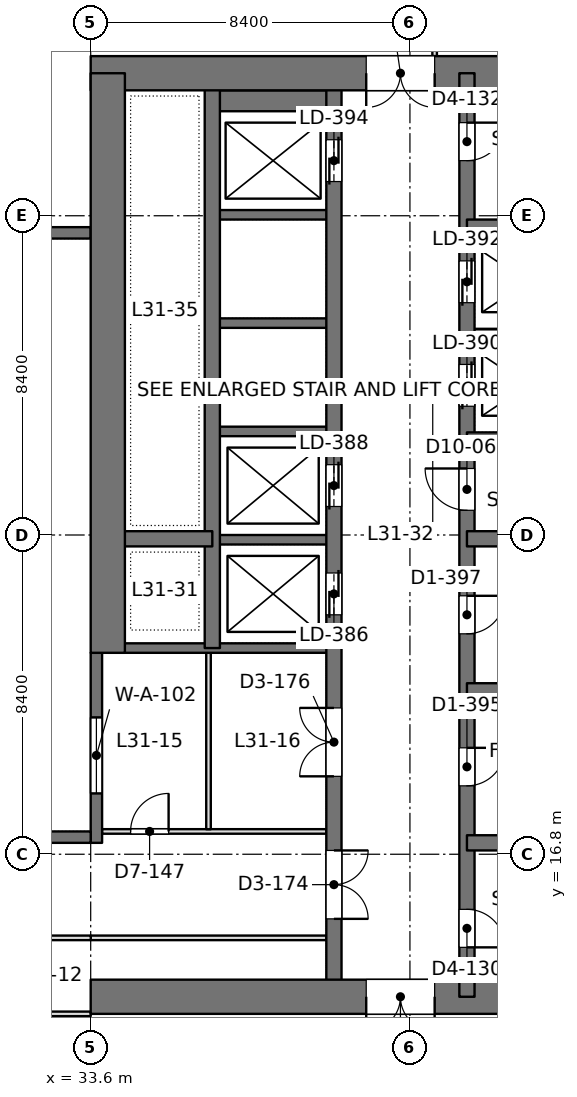
"""IFC4 building model, lengths in metres.
Left out: names, types, materials, properties, quantities, classifications, styles, units other than length and angle.
Written with IfcOpenShell. Run it as: python <this file> out.ifc"""

import sys

from ifc_helpers import new_model, si_unit, direction, frame, frame_2d, origin, place, context, subcontext, project, spatial, rectangle, extrude, element, fill, save


model = new_model("IFC4")
c1 = context("Model", 3, precision=1e-05, world=origin(), true_north=direction((0.0, 1.0)))
c2 = subcontext(c1, "Body", "Model", "MODEL_VIEW")
j1 = project(units=[si_unit("LENGTHUNIT", "METRE"), si_unit("PLANEANGLEUNIT", "RADIAN")], contexts=[c1])
p1 = place(None, origin())
s1 = spatial("IfcSite", under=j1, at=p1, CompositionType="ELEMENT")
p2 = place(p1, origin())
s2 = spatial("IfcBuilding", under=s1, at=p2, CompositionType="ELEMENT")
p3 = place(p2, frame((0.0, 0.0, 138.6)))
s3 = spatial("IfcBuildingStorey", under=s2, at=p3, CompositionType="ELEMENT", Elevation=138.6)
p4 = place(p3, frame((33.6, 13.05, 0.0), z_axis=(0.0, 0.0, 1.0), x_axis=(1.0, 0.0, 0.0)))
e1 = element("IfcWall", 1, at=p4, inside=s3, PredefinedType="SHEAR", context=c2, shape_type="SweptSolid", body=[
    extrude(rectangle(XDim=18.0, YDim=0.9, at=frame_2d((9.0, 0.0))), origin(), (0.0, 0.0, 1.0), 4.2),
])
p5 = place(p4, frame((7.25, 0.0, 0.0)))
e2 = element("IfcOpeningElement", 2, at=p5, cuts=e1, PredefinedType="OPENING", context=c2, shape_type="SweptSolid", body=[
    extrude(rectangle(XDim=1.8, YDim=2.4, at=frame_2d((0.9, 1.2))), frame((0.0, 0.46, 0.0), z_axis=(0.0, -1.0, 0.0), x_axis=(1.0, 0.0, 0.0)), (0.0, 0.0, 1.0), 0.92),
])
p6 = place(p3, frame((33.6, 37.35, 0.0), z_axis=(0.0, 0.0, 1.0), x_axis=(1.0, 0.0, 0.0)))
e3 = element("IfcWall", 3, at=p6, inside=s3, PredefinedType="SHEAR", context=c2, shape_type="SweptSolid", body=[
    extrude(rectangle(XDim=18.0, YDim=0.9, at=frame_2d((9.0, 0.0))), origin(), (0.0, 0.0, 1.0), 4.2),
])
p7 = place(p6, frame((7.25, 0.0, 0.0)))
e4 = element("IfcOpeningElement", 4, at=p7, cuts=e3, PredefinedType="OPENING", context=c2, shape_type="SweptSolid", body=[
    extrude(rectangle(XDim=1.8, YDim=2.4, at=frame_2d((0.9, 1.2))), frame((0.0, 0.46, 0.0), z_axis=(0.0, -1.0, 0.0), x_axis=(1.0, 0.0, 0.0)), (0.0, 0.0, 1.0), 0.92),
])
p8 = place(p3, frame((34.05, 22.1, 0.0), z_axis=(0.0, 0.0, 1.0), x_axis=(0.0, 1.0, 0.0)))
e5 = element("IfcWall", 5, at=p8, inside=s3, PredefinedType="SHEAR", context=c2, shape_type="SweptSolid", body=[
    extrude(rectangle(XDim=15.25, YDim=0.9, at=frame_2d((7.625, 0.0))), origin(), (0.0, 0.0, 1.0), 4.2),
])
p9 = place(p3, frame((43.5, 13.05, 0.0), z_axis=(0.0, 0.0, 1.0), x_axis=(0.0, 1.0, 0.0)))
e6 = element("IfcWall", 6, at=p9, inside=s3, PredefinedType="SHEAR", context=c2, shape_type="SweptSolid", body=[
    extrude(rectangle(XDim=24.3, YDim=0.4, at=frame_2d((12.15, 0.0))), origin(), (0.0, 0.0, 1.0), 4.2),
])
p10 = place(p9, frame((1.3, 0.0, 0.0)))
e7 = element("IfcOpeningElement", 7, at=p10, cuts=e6, PredefinedType="OPENING", context=c2, shape_type="SweptSolid", body=[
    extrude(rectangle(XDim=1.0, YDim=2.2, at=frame_2d((0.5, 1.1))), frame((0.0, 0.21, 0.0), z_axis=(0.0, -1.0, 0.0), x_axis=(1.0, 0.0, 0.0)), (0.0, 0.0, 1.0), 0.42),
])
p11 = place(p9, frame((22.0, 0.0, 0.0)))
e8 = element("IfcOpeningElement", 8, at=p11, cuts=e6, PredefinedType="OPENING", context=c2, shape_type="SweptSolid", body=[
    extrude(rectangle(XDim=1.0, YDim=2.2, at=frame_2d((0.5, 1.1))), frame((0.0, 0.21, 0.0), z_axis=(0.0, -1.0, 0.0), x_axis=(1.0, 0.0, 0.0)), (0.0, 0.0, 1.0), 0.42),
])
p12 = place(p9, frame((5.55, 0.0, 0.0)))
e9 = element("IfcOpeningElement", 9, at=p12, cuts=e6, PredefinedType="OPENING", context=c2, shape_type="SweptSolid", body=[
    extrude(rectangle(XDim=1.0, YDim=2.2, at=frame_2d((0.5, 1.1))), frame((0.0, 0.21, 0.0), z_axis=(0.0, -1.0, 0.0), x_axis=(1.0, 0.0, 0.0)), (0.0, 0.0, 1.0), 0.42),
])
p13 = place(p9, frame((9.55, 0.0, 0.0)))
e10 = element("IfcOpeningElement", 10, at=p13, cuts=e6, PredefinedType="OPENING", context=c2, shape_type="SweptSolid", body=[
    extrude(rectangle(XDim=1.0, YDim=2.2, at=frame_2d((0.5, 1.1))), frame((0.0, 0.21, 0.0), z_axis=(0.0, -1.0, 0.0), x_axis=(1.0, 0.0, 0.0)), (0.0, 0.0, 1.0), 0.42),
])
p14 = place(p9, frame((12.8, 0.0, 0.0)))
e11 = element("IfcOpeningElement", 11, at=p14, cuts=e6, PredefinedType="OPENING", context=c2, shape_type="SweptSolid", body=[
    extrude(rectangle(XDim=1.1, YDim=2.2, at=frame_2d((0.55, 1.1))), frame((0.0, 0.21, 0.0), z_axis=(0.0, -1.0, 0.0), x_axis=(1.0, 0.0, 0.0)), (0.0, 0.0, 1.0), 0.42),
])
p15 = place(p9, frame((15.538, 0.0, 0.0)))
e12 = element("IfcOpeningElement", 12, at=p15, cuts=e6, PredefinedType="OPENING", context=c2, shape_type="SweptSolid", body=[
    extrude(rectangle(XDim=1.1, YDim=2.2, at=frame_2d((0.55, 1.1))), frame((0.0, 0.21, 0.0), z_axis=(0.0, -1.0, 0.0), x_axis=(1.0, 0.0, 0.0)), (0.0, 0.0, 1.0), 0.42),
])
p16 = place(p9, frame((18.262, 0.0, 0.0)))
e13 = element("IfcOpeningElement", 13, at=p16, cuts=e6, PredefinedType="OPENING", context=c2, shape_type="SweptSolid", body=[
    extrude(rectangle(XDim=1.1, YDim=2.2, at=frame_2d((0.55, 1.1))), frame((0.0, 0.21, 0.0), z_axis=(0.0, -1.0, 0.0), x_axis=(1.0, 0.0, 0.0)), (0.0, 0.0, 1.0), 0.42),
])
p17 = place(p3, frame((40.0, 13.05, 0.0), z_axis=(0.0, 0.0, 1.0), x_axis=(0.0, 1.0, 0.0)))
e14 = element("IfcWall", 14, at=p17, inside=s3, PredefinedType="SHEAR", context=c2, shape_type="SweptSolid", body=[
    extrude(rectangle(XDim=24.3, YDim=0.4, at=frame_2d((12.15, 0.0))), origin(), (0.0, 0.0, 1.0), 4.2),
])
p18 = place(p17, frame((10.05, 0.0, 0.0)))
e15 = element("IfcOpeningElement", 15, at=p18, cuts=e14, PredefinedType="OPENING", context=c2, shape_type="SweptSolid", body=[
    extrude(rectangle(XDim=1.1, YDim=2.2, at=frame_2d((0.55, 1.1))), frame((0.0, 0.21, 0.0), z_axis=(0.0, -1.0, 0.0), x_axis=(1.0, 0.0, 0.0)), (0.0, 0.0, 1.0), 0.42),
])
p19 = place(p17, frame((12.9, 0.0, 0.0)))
e16 = element("IfcOpeningElement", 16, at=p19, cuts=e14, PredefinedType="OPENING", context=c2, shape_type="SweptSolid", body=[
    extrude(rectangle(XDim=1.1, YDim=2.2, at=frame_2d((0.55, 1.1))), frame((0.0, 0.21, 0.0), z_axis=(0.0, -1.0, 0.0), x_axis=(1.0, 0.0, 0.0)), (0.0, 0.0, 1.0), 0.42),
])
p20 = place(p17, frame((21.45, 0.0, 0.0)))
e17 = element("IfcOpeningElement", 17, at=p20, cuts=e14, PredefinedType="OPENING", context=c2, shape_type="SweptSolid", body=[
    extrude(rectangle(XDim=1.1, YDim=2.2, at=frame_2d((0.55, 1.1))), frame((0.0, 0.21, 0.0), z_axis=(0.0, -1.0, 0.0), x_axis=(1.0, 0.0, 0.0)), (0.0, 0.0, 1.0), 0.42),
])
p21 = place(p17, frame((2.05, 0.0, 0.0)))
e18 = element("IfcOpeningElement", 18, at=p21, cuts=e14, PredefinedType="OPENING", context=c2, shape_type="SweptSolid", body=[
    extrude(rectangle(XDim=1.8, YDim=2.4, at=frame_2d((0.9, 1.2))), frame((0.0, 0.21, 0.0), z_axis=(0.0, -1.0, 0.0), x_axis=(1.0, 0.0, 0.0)), (0.0, 0.0, 1.0), 0.42),
])
p22 = place(p17, frame((5.8, 0.0, 0.0)))
e19 = element("IfcOpeningElement", 19, at=p22, cuts=e14, PredefinedType="OPENING", context=c2, shape_type="SweptSolid", body=[
    extrude(rectangle(XDim=1.8, YDim=2.4, at=frame_2d((0.9, 1.2))), frame((0.0, 0.21, 0.0), z_axis=(0.0, -1.0, 0.0), x_axis=(1.0, 0.0, 0.0)), (0.0, 0.0, 1.0), 0.42),
])
p23 = place(p3, frame((36.8, 22.225, 0.0), z_axis=(0.0, 0.0, 1.0), x_axis=(0.0, 1.0, 0.0)))
e20 = element("IfcWall", 20, at=p23, inside=s3, PredefinedType="SHEAR", context=c2, shape_type="SweptSolid", body=[
    extrude(rectangle(XDim=15.125, YDim=0.4, at=frame_2d((7.562, 0.0))), origin(), (0.0, 0.0, 1.0), 4.2),
])
for number, where, z_axis, x_axis in (
    (21, (51.15, 17.1, 0.0), (0.0, 0.0, 1.0), (-1.0, 0.0, 0.0)),
    (22, (51.15, 21.1, 0.0), (0.0, 0.0, 1.0), (-1.0, 0.0, 0.0)),
    (23, (51.15, 25.1, 0.0), (0.0, 0.0, 1.0), (-1.0, 0.0, 0.0)),
    (24, (51.15, 27.7, 0.0), (0.0, 0.0, 1.0), (-1.0, 0.0, 0.0)),
    (25, (51.15, 33.3, 0.0), (0.0, 0.0, 1.0), (-1.0, 0.0, 0.0)),
):
    element("IfcWall", number, at=place(p3, frame(where, z_axis=z_axis, x_axis=x_axis)), inside=s3, PredefinedType="SHEAR", context=c2, shape_type="SweptSolid", body=[
        extrude(rectangle(XDim=7.65, YDim=0.4, at=frame_2d((3.825, 0.0))), origin(), (0.0, 0.0, 1.0), 4.2),
    ])
p24 = place(p3, frame((46.7, 30.5, 0.0), z_axis=(0.0, 0.0, 1.0), x_axis=(-1.0, 0.0, 0.0)))
e26 = element("IfcWall", 26, at=p24, inside=s3, PredefinedType="SHEAR", context=c2, shape_type="SweptSolid", body=[
    extrude(rectangle(XDim=3.2, YDim=0.25, at=frame_2d((1.6, 0.0))), origin(), (0.0, 0.0, 1.0), 4.2),
])
p25 = place(p3, frame((36.8, 25.1, 0.0), z_axis=(0.0, 0.0, 1.0), x_axis=(-1.0, 0.0, 0.0)))
e27 = element("IfcWall", 27, at=p25, inside=s3, PredefinedType="SHEAR", context=c2, shape_type="SweptSolid", body=[
    extrude(rectangle(XDim=2.75, YDim=0.4, at=frame_2d((1.375, 0.0))), origin(), (0.0, 0.0, 1.0), 4.2),
])
p26 = place(p3, frame((40.0, 22.225, 0.0), z_axis=(0.0, 0.0, 1.0), x_axis=(-1.0, 0.0, 0.0)))
e28 = element("IfcWall", 28, at=p26, inside=s3, PredefinedType="SHEAR", context=c2, shape_type="SweptSolid", body=[
    extrude(rectangle(XDim=5.95, YDim=0.25, at=frame_2d((2.975, 0.0))), origin(), (0.0, 0.0, 1.0), 4.2),
])
for number, where, z_axis, x_axis in (
    (29, (40.0, 25.075, 0.0), (0.0, 0.0, 1.0), (-1.0, 0.0, 0.0)),
    (30, (40.0, 27.925, 0.0), (0.0, 0.0, 1.0), (-1.0, 0.0, 0.0)),
    (31, (40.0, 30.775, 0.0), (0.0, 0.0, 1.0), (-1.0, 0.0, 0.0)),
    (32, (40.0, 33.625, 0.0), (0.0, 0.0, 1.0), (-1.0, 0.0, 0.0)),
):
    element("IfcWall", number, at=place(p3, frame(where, z_axis=z_axis, x_axis=x_axis)), inside=s3, PredefinedType="SHEAR", context=c2, shape_type="SweptSolid", body=[
        extrude(rectangle(XDim=3.2, YDim=0.25, at=frame_2d((1.6, 0.0))), origin(), (0.0, 0.0, 1.0), 4.2),
    ])
p27 = place(p3, frame((40.0, 36.625, 0.0), z_axis=(0.0, 0.0, 1.0), x_axis=(-1.0, 0.0, 0.0)))
e33 = element("IfcWall", 33, at=p27, inside=s3, PredefinedType="SHEAR", context=c2, shape_type="SweptSolid", body=[
    extrude(rectangle(XDim=3.2, YDim=0.55, at=frame_2d((1.6, 0.0))), origin(), (0.0, 0.0, 1.0), 4.2),
])
p28 = place(p3, frame((33.75, 17.1, 0.0), z_axis=(0.0, 0.0, 1.0), x_axis=(0.0, 1.0, 0.0)))
e34 = element("IfcWall", 34, at=p28, inside=s3, PredefinedType="SOLIDWALL", context=c2, shape_type="SweptSolid", body=[
    extrude(rectangle(XDim=5.0, YDim=0.3, at=frame_2d((2.5, 0.0))), origin(), (0.0, 0.0, 1.0), 4.05),
])
p29 = place(p28, frame((1.3, 0.0, 0.1)))
e35 = element("IfcOpeningElement", 35, at=p29, cuts=e34, PredefinedType="OPENING", context=c2, shape_type="SweptSolid", body=[
    extrude(rectangle(XDim=2.0, YDim=3.0, at=frame_2d((1.0, 1.5))), frame((0.0, 0.16, 0.0), z_axis=(0.0, -1.0, 0.0), x_axis=(1.0, 0.0, 0.0)), (0.0, 0.0, 1.0), 0.32),
])
p30 = place(p3, frame((26.025, 17.25, 0.0), z_axis=(0.0, 0.0, 1.0), x_axis=(1.0, 0.0, 0.0)))
e36 = element("IfcWall", 36, at=p30, inside=s3, PredefinedType="SOLIDWALL", context=c2, shape_type="SweptSolid", body=[
    extrude(rectangle(XDim=7.575, YDim=0.3, at=frame_2d((3.788, 0.0))), origin(), (0.0, 0.0, 1.0), 4.05),
])
p31 = place(p30, frame((0.587, 0.0, 0.1)))
e37 = element("IfcOpeningElement", 37, at=p31, cuts=e36, PredefinedType="OPENING", context=c2, shape_type="SweptSolid", body=[
    extrude(rectangle(XDim=2.0, YDim=3.0, at=frame_2d((1.0, 1.5))), frame((0.0, 0.16, 0.0), z_axis=(0.0, -1.0, 0.0), x_axis=(1.0, 0.0, 0.0)), (0.0, 0.0, 1.0), 0.32),
])
p32 = place(p30, frame((4.188, 0.0, 0.1)))
e38 = element("IfcOpeningElement", 38, at=p32, cuts=e36, PredefinedType="OPENING", context=c2, shape_type="SweptSolid", body=[
    extrude(rectangle(XDim=2.0, YDim=3.0, at=frame_2d((1.0, 1.5))), frame((0.0, 0.16, 0.0), z_axis=(0.0, -1.0, 0.0), x_axis=(1.0, 0.0, 0.0)), (0.0, 0.0, 1.0), 0.32),
])
p33 = place(p3, frame((26.025, 33.15, 0.0), z_axis=(0.0, 0.0, 1.0), x_axis=(1.0, 0.0, 0.0)))
e39 = element("IfcWall", 39, at=p33, inside=s3, PredefinedType="SOLIDWALL", context=c2, shape_type="SweptSolid", body=[
    extrude(rectangle(XDim=7.575, YDim=0.3, at=frame_2d((3.788, 0.0))), origin(), (0.0, 0.0, 1.0), 4.05),
])
p34 = place(p33, frame((0.587, 0.0, 0.1)))
e40 = element("IfcOpeningElement", 40, at=p34, cuts=e39, PredefinedType="OPENING", context=c2, shape_type="SweptSolid", body=[
    extrude(rectangle(XDim=2.0, YDim=3.0, at=frame_2d((1.0, 1.5))), frame((0.0, 0.16, 0.0), z_axis=(0.0, -1.0, 0.0), x_axis=(1.0, 0.0, 0.0)), (0.0, 0.0, 1.0), 0.32),
])
p35 = place(p33, frame((4.188, 0.0, 0.1)))
e41 = element("IfcOpeningElement", 41, at=p35, cuts=e39, PredefinedType="OPENING", context=c2, shape_type="SweptSolid", body=[
    extrude(rectangle(XDim=2.0, YDim=3.0, at=frame_2d((1.0, 1.5))), frame((0.0, 0.16, 0.0), z_axis=(0.0, -1.0, 0.0), x_axis=(1.0, 0.0, 0.0)), (0.0, 0.0, 1.0), 0.32),
])
p36 = place(p3, frame((33.898, 17.4, 0.0), z_axis=(0.0, 0.0, 1.0), x_axis=(1.0, 0.0, 0.0)))
e42 = element("IfcWall", 42, at=p36, inside=s3, PredefinedType="PARTITIONING", context=c2, shape_type="SweptSolid", body=[
    extrude(rectangle(XDim=5.904, YDim=0.12, at=frame_2d((2.952, 0.0))), origin(), (0.0, 0.0, 1.0), 3.55),
])
p37 = place(p36, frame((0.752, 0.0, 0.0)))
e43 = element("IfcOpeningElement", 43, at=p37, cuts=e42, PredefinedType="OPENING", context=c2, shape_type="SweptSolid", body=[
    extrude(rectangle(XDim=1.0, YDim=2.4, at=frame_2d((0.5, 1.2))), frame((0.0, 0.07, 0.0), z_axis=(0.0, -1.0, 0.0), x_axis=(1.0, 0.0, 0.0)), (0.0, 0.0, 1.0), 0.14),
])
p38 = place(p3, frame((36.7, 17.458, 0.0), z_axis=(0.0, 0.0, 1.0), x_axis=(0.0, 1.0, 0.0)))
e44 = element("IfcWall", 44, at=p38, inside=s3, PredefinedType="PARTITIONING", context=c2, shape_type="SweptSolid", body=[
    extrude(rectangle(XDim=4.644, YDim=0.12, at=frame_2d((2.322, 0.0))), origin(), (0.0, 0.0, 1.0), 3.6),
])
p39 = place(p3, frame((33.598, 14.6, 0.0), z_axis=(0.0, 0.0, 1.0), x_axis=(1.0, 0.0, 0.0)))
e45 = element("IfcWall", 45, at=p39, inside=s3, PredefinedType="PARTITIONING", context=c2, shape_type="SweptSolid", body=[
    extrude(rectangle(XDim=6.204, YDim=0.12, at=frame_2d((3.102, 0.0))), origin(), (0.0, 0.0, 1.0), 3.55),
])
p40 = place(p3, frame((16.798, 14.6, 0.0), z_axis=(0.0, 0.0, 1.0), x_axis=(1.0, 0.0, 0.0)))
e46 = element("IfcWall", 46, at=p40, inside=s3, PredefinedType="PARTITIONING", context=c2, shape_type="SweptSolid", body=[
    extrude(rectangle(XDim=16.804, YDim=0.12, at=frame_2d((8.402, 0.0))), origin(), (0.0, 0.0, 1.0), 3.55),
])
p41 = place(p40, frame((3.702, 0.0, 0.0)))
e47 = element("IfcOpeningElement", 47, at=p41, cuts=e46, PredefinedType="OPENING", context=c2, shape_type="SweptSolid", body=[
    extrude(rectangle(XDim=1.0, YDim=2.4, at=frame_2d((0.5, 1.2))), frame((0.0, 0.07, 0.0), z_axis=(0.0, -1.0, 0.0), x_axis=(1.0, 0.0, 0.0)), (0.0, 0.0, 1.0), 0.14),
])
p42 = place(p40, frame((12.102, 0.0, 0.0)))
e48 = element("IfcOpeningElement", 48, at=p42, cuts=e46, PredefinedType="OPENING", context=c2, shape_type="SweptSolid", body=[
    extrude(rectangle(XDim=1.0, YDim=2.4, at=frame_2d((0.5, 1.2))), frame((0.0, 0.07, 0.0), z_axis=(0.0, -1.0, 0.0), x_axis=(1.0, 0.0, 0.0)), (0.0, 0.0, 1.0), 0.14),
])
p43 = place(p3, frame((16.8, 12.6, 0.0), z_axis=(0.0, 0.0, 1.0), x_axis=(1.0, 0.0, 0.0)))
e49 = element("IfcWall", 49, at=p43, inside=s3, PredefinedType="PARTITIONING", context=c2, shape_type="SweptSolid", body=[
    extrude(rectangle(XDim=16.8, YDim=0.12, at=frame_2d((8.4, 0.0))), origin(), (0.0, 0.0, 1.0), 3.55),
])
p44 = place(p3, frame((42.65, 37.8, 0.0), z_axis=(0.0, 0.0, 1.0), x_axis=(0.0, 1.0, 0.0)))
e50 = element("IfcWall", 50, at=p44, inside=s3, PredefinedType="PARTITIONING", context=c2, shape_type="SweptSolid", body=[
    extrude(rectangle(XDim=2.0, YDim=0.12, at=frame_2d((1.0, 0.0))), origin(), (0.0, 0.0, 1.0), 4.05),
])
p45 = place(p29, origin())
e51 = element("IfcWindow", 51, at=p45, inside=s3, PartitioningType="SINGLE_PANEL", PredefinedType="WINDOW", context=c2, shape_type="SweptSolid", body=[
    extrude(rectangle(XDim=2.0, YDim=3.0, at=frame_2d((1.0, 1.5))), frame((0.0, 0.03, 0.0), z_axis=(0.0, -1.0, 0.0), x_axis=(1.0, 0.0, 0.0)), (0.0, 0.0, 1.0), 0.06),
])
fill(e35, e51)
p46 = place(p5, frame((1.8, 0.0, 0.0), z_axis=(0.0, 0.0, 1.0), x_axis=(-1.0, 0.0, 0.0)))
e52 = element("IfcDoor", 52, at=p46, inside=s3, OperationType="DOUBLE_DOOR_SINGLE_SWING", PredefinedType="DOOR", context=c2, shape_type="SweptSolid", body=[
    extrude(rectangle(XDim=1.8, YDim=2.4, at=frame_2d((0.9, 1.2))), frame((0.0, 0.025, 0.0), z_axis=(0.0, -1.0, 0.0), x_axis=(1.0, 0.0, 0.0)), (0.0, 0.0, 1.0), 0.05),
])
fill(e2, e52)
p47 = place(p7, frame((1.8, 0.0, 0.0), z_axis=(0.0, 0.0, 1.0), x_axis=(-1.0, 0.0, 0.0)))
e53 = element("IfcDoor", 53, at=p47, inside=s3, OperationType="DOUBLE_DOOR_SINGLE_SWING", PredefinedType="DOOR", context=c2, shape_type="SweptSolid", body=[
    extrude(rectangle(XDim=1.8, YDim=2.4, at=frame_2d((0.9, 1.2))), frame((0.0, 0.025, 0.0), z_axis=(0.0, -1.0, 0.0), x_axis=(1.0, 0.0, 0.0)), (0.0, 0.0, 1.0), 0.05),
])
fill(e4, e53)
p48 = place(p10, frame((1.0, 0.0, 0.0), z_axis=(0.0, 0.0, 1.0), x_axis=(-1.0, 0.0, 0.0)))
e54 = element("IfcDoor", 54, at=p48, inside=s3, OperationType="SINGLE_SWING_RIGHT", PredefinedType="DOOR", context=c2, shape_type="SweptSolid", body=[
    extrude(rectangle(XDim=1.0, YDim=2.2, at=frame_2d((0.5, 1.1))), frame((0.0, 0.025, 0.0), z_axis=(0.0, -1.0, 0.0), x_axis=(1.0, 0.0, 0.0)), (0.0, 0.0, 1.0), 0.05),
])
fill(e7, e54)
p49 = place(p11, frame((1.0, 0.0, 0.0), z_axis=(0.0, 0.0, 1.0), x_axis=(-1.0, 0.0, 0.0)))
e55 = element("IfcDoor", 55, at=p49, inside=s3, OperationType="SINGLE_SWING_LEFT", PredefinedType="DOOR", context=c2, shape_type="SweptSolid", body=[
    extrude(rectangle(XDim=1.0, YDim=2.2, at=frame_2d((0.5, 1.1))), frame((0.0, 0.025, 0.0), z_axis=(0.0, -1.0, 0.0), x_axis=(1.0, 0.0, 0.0)), (0.0, 0.0, 1.0), 0.05),
])
fill(e8, e55)
p50 = place(p12, frame((1.0, 0.0, 0.0), z_axis=(0.0, 0.0, 1.0), x_axis=(-1.0, 0.0, 0.0)))
e56 = element("IfcDoor", 56, at=p50, inside=s3, OperationType="SINGLE_SWING_LEFT", PredefinedType="DOOR", context=c2, shape_type="SweptSolid", body=[
    extrude(rectangle(XDim=1.0, YDim=2.2, at=frame_2d((0.5, 1.1))), frame((0.0, 0.025, 0.0), z_axis=(0.0, -1.0, 0.0), x_axis=(1.0, 0.0, 0.0)), (0.0, 0.0, 1.0), 0.05),
])
fill(e9, e56)
p51 = place(p13, frame((1.0, 0.0, 0.0), z_axis=(0.0, 0.0, 1.0), x_axis=(-1.0, 0.0, 0.0)))
e57 = element("IfcDoor", 57, at=p51, inside=s3, OperationType="SINGLE_SWING_LEFT", PredefinedType="DOOR", context=c2, shape_type="SweptSolid", body=[
    extrude(rectangle(XDim=1.0, YDim=2.2, at=frame_2d((0.5, 1.1))), frame((0.0, 0.025, 0.0), z_axis=(0.0, -1.0, 0.0), x_axis=(1.0, 0.0, 0.0)), (0.0, 0.0, 1.0), 0.05),
])
fill(e10, e57)
p52 = place(p14, origin())
e58 = element("IfcDoor", 58, at=p52, inside=s3, OperationType="SINGLE_SWING_RIGHT", PredefinedType="DOOR", context=c2, shape_type="SweptSolid", body=[
    extrude(rectangle(XDim=1.1, YDim=2.2, at=frame_2d((0.55, 1.1))), frame((0.0, 0.025, 0.0), z_axis=(0.0, -1.0, 0.0), x_axis=(1.0, 0.0, 0.0)), (0.0, 0.0, 1.0), 0.05),
])
fill(e11, e58)
p53 = place(p18, origin())
e59 = element("IfcDoor", 59, at=p53, inside=s3, OperationType="DOUBLE_DOOR_SLIDING", PredefinedType="DOOR", context=c2, shape_type="SweptSolid", body=[
    extrude(rectangle(XDim=1.1, YDim=2.2, at=frame_2d((0.55, 1.1))), frame((0.0, 0.025, 0.0), z_axis=(0.0, -1.0, 0.0), x_axis=(1.0, 0.0, 0.0)), (0.0, 0.0, 1.0), 0.05),
])
fill(e15, e59)
p54 = place(p19, origin())
e60 = element("IfcDoor", 60, at=p54, inside=s3, OperationType="DOUBLE_DOOR_SLIDING", PredefinedType="DOOR", context=c2, shape_type="SweptSolid", body=[
    extrude(rectangle(XDim=1.1, YDim=2.2, at=frame_2d((0.55, 1.1))), frame((0.0, 0.025, 0.0), z_axis=(0.0, -1.0, 0.0), x_axis=(1.0, 0.0, 0.0)), (0.0, 0.0, 1.0), 0.05),
])
fill(e16, e60)
p55 = place(p20, origin())
e61 = element("IfcDoor", 61, at=p55, inside=s3, OperationType="DOUBLE_DOOR_SLIDING", PredefinedType="DOOR", context=c2, shape_type="SweptSolid", body=[
    extrude(rectangle(XDim=1.1, YDim=2.2, at=frame_2d((0.55, 1.1))), frame((0.0, 0.025, 0.0), z_axis=(0.0, -1.0, 0.0), x_axis=(1.0, 0.0, 0.0)), (0.0, 0.0, 1.0), 0.05),
])
fill(e17, e61)
p56 = place(p15, origin())
e62 = element("IfcDoor", 62, at=p56, inside=s3, OperationType="DOUBLE_DOOR_SLIDING", PredefinedType="DOOR", context=c2, shape_type="SweptSolid", body=[
    extrude(rectangle(XDim=1.1, YDim=2.2, at=frame_2d((0.55, 1.1))), frame((0.0, 0.025, 0.0), z_axis=(0.0, -1.0, 0.0), x_axis=(1.0, 0.0, 0.0)), (0.0, 0.0, 1.0), 0.05),
])
fill(e12, e62)
p57 = place(p16, origin())
e63 = element("IfcDoor", 63, at=p57, inside=s3, OperationType="DOUBLE_DOOR_SLIDING", PredefinedType="DOOR", context=c2, shape_type="SweptSolid", body=[
    extrude(rectangle(XDim=1.1, YDim=2.2, at=frame_2d((0.55, 1.1))), frame((0.0, 0.025, 0.0), z_axis=(0.0, -1.0, 0.0), x_axis=(1.0, 0.0, 0.0)), (0.0, 0.0, 1.0), 0.05),
])
fill(e13, e63)
p58 = place(p21, frame((1.8, 0.0, 0.0), z_axis=(0.0, 0.0, 1.0), x_axis=(-1.0, 0.0, 0.0)))
e64 = element("IfcDoor", 64, at=p58, inside=s3, OperationType="DOUBLE_DOOR_SINGLE_SWING", PredefinedType="DOOR", context=c2, shape_type="SweptSolid", body=[
    extrude(rectangle(XDim=1.8, YDim=2.4, at=frame_2d((0.9, 1.2))), frame((0.0, 0.025, 0.0), z_axis=(0.0, -1.0, 0.0), x_axis=(1.0, 0.0, 0.0)), (0.0, 0.0, 1.0), 0.05),
])
fill(e18, e64)
p59 = place(p22, origin())
e65 = element("IfcDoor", 65, at=p59, inside=s3, OperationType="DOUBLE_DOOR_SINGLE_SWING", PredefinedType="DOOR", context=c2, shape_type="SweptSolid", body=[
    extrude(rectangle(XDim=1.8, YDim=2.4, at=frame_2d((0.9, 1.2))), frame((0.0, 0.025, 0.0), z_axis=(0.0, -1.0, 0.0), x_axis=(1.0, 0.0, 0.0)), (0.0, 0.0, 1.0), 0.05),
])
fill(e19, e65)
p60 = place(p37, origin())
e66 = element("IfcDoor", 66, at=p60, inside=s3, OperationType="SINGLE_SWING_RIGHT", PredefinedType="DOOR", context=c2, shape_type="SweptSolid", body=[
    extrude(rectangle(XDim=1.0, YDim=2.4, at=frame_2d((0.5, 1.2))), frame((0.0, 0.025, 0.0), z_axis=(0.0, -1.0, 0.0), x_axis=(1.0, 0.0, 0.0)), (0.0, 0.0, 1.0), 0.05),
])
fill(e43, e66)
save(model, sys.argv[1])
